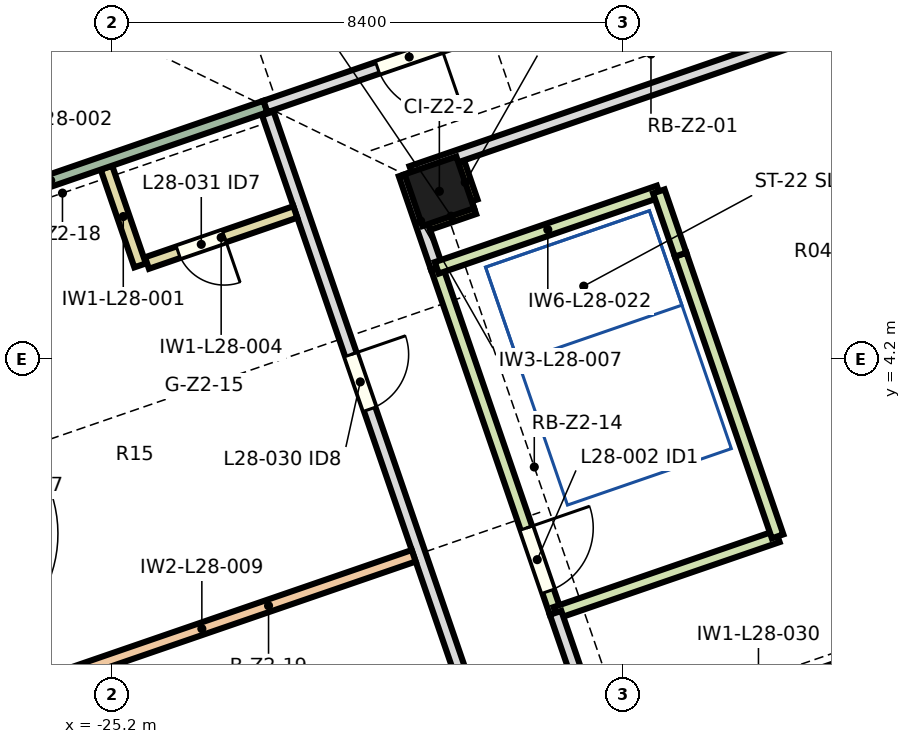
"""IFC4 building model, lengths in metres.
Left out: names, types, materials, properties, quantities, classifications, styles, units other than length and angle.
Written with IfcOpenShell. Run it as: python <this file> out.ifc"""

import sys

from ifc_helpers import new_model, si_unit, direction, frame, frame_2d, origin, origin_2d, place, context, subcontext, project, spatial, rectangle, extrude, element, fill, save


model = new_model("IFC4")
c1 = context("Model", 3, precision=1e-05, world=origin(), true_north=direction((0.0, 1.0)))
c2 = subcontext(c1, "Body", "Model", "MODEL_VIEW")
j1 = project(units=[si_unit("LENGTHUNIT", "METRE"), si_unit("PLANEANGLEUNIT", "RADIAN")], contexts=[c1])
p1 = place(None, origin())
s1 = spatial("IfcSite", under=j1, at=p1, CompositionType="ELEMENT")
p2 = place(p1, origin())
s2 = spatial("IfcBuilding", under=s1, at=p2, CompositionType="ELEMENT")
p3 = place(p2, frame((0.0, 0.0, 134.5)))
s3 = spatial("IfcBuildingStorey", under=s2, at=p3, CompositionType="ELEMENT", Elevation=134.5)
p4 = place(p3, frame((-19.802, 6.983, 0.0), z_axis=(0.0, 0.0, 1.0), x_axis=(0.945518575599, 0.325568154457, 0.0)))
e1 = element("IfcColumn", 1, at=p4, inside=s3, PredefinedType="COLUMN", context=c2, shape_type="SweptSolid", body=[
    extrude(rectangle(XDim=0.9, YDim=0.9, at=origin_2d()), origin(), (0.0, 0.0, 1.0), 3.55),
])
p5 = place(p3, frame((-28.282, 1.663, 0.0), z_axis=(0.0, 0.0, 1.0), x_axis=(0.325580990241, -0.945514155787, 0.0)))
e2 = element("IfcWall", 2, at=p5, inside=s3, PredefinedType="SOLIDWALL", context=c2, shape_type="SweptSolid", body=[
    extrude(rectangle(XDim=6.52, YDim=0.3, at=frame_2d((3.26, 0.0))), origin(), (0.0, 0.0, 1.0), 3.09),
])
p6 = place(p5, frame((0.33, 0.0, 0.0)))
e3 = element("IfcOpeningElement", 3, at=p6, cuts=e2, PredefinedType="OPENING", context=c2, shape_type="SweptSolid", body=[
    extrude(rectangle(XDim=2.1, YDim=2.4, at=frame_2d((1.05, 1.2))), frame((0.0, 0.16, 0.0), z_axis=(0.0, -1.0, 0.0), x_axis=(1.0, 0.0, 0.0)), (0.0, 0.0, 1.0), 0.32),
])
p7 = place(p5, frame((4.24, 0.0, 0.9)))
e4 = element("IfcOpeningElement", 4, at=p7, cuts=e2, PredefinedType="OPENING", context=c2, shape_type="SweptSolid", body=[
    extrude(rectangle(XDim=1.8, YDim=1.5, at=frame_2d((0.9, 0.75))), frame((0.0, 0.16, 0.0), z_axis=(0.0, -1.0, 0.0), x_axis=(1.0, 0.0, 0.0)), (0.0, 0.0, 1.0), 0.32),
])
p8 = place(p3, frame((-24.724, 5.765, 0.0), z_axis=(0.0, 0.0, 1.0), x_axis=(-0.325561349174, 0.945520918819, 0.0)))
e5 = element("IfcWall", 5, at=p8, inside=s3, PredefinedType="PARTITIONING", context=c2, shape_type="SweptSolid", body=[
    extrude(rectangle(XDim=1.7, YDim=0.2, at=frame_2d((0.85, 0.0))), origin(), (0.0, 0.0, 1.0), 3.55),
])
p9 = place(p3, frame((-22.662, 8.378, 0.0), z_axis=(0.0, 0.0, 1.0), x_axis=(-0.945512517373, -0.325585748291, 0.0)))
e6 = element("IfcWall", 6, at=p9, inside=s3, PredefinedType="PARTITIONING", context=c2, shape_type="SweptSolid", body=[
    extrude(rectangle(XDim=7.47, YDim=0.2, at=frame_2d((3.735, 0.0))), origin(), (0.0, 0.0, 1.0), 3.55),
])
p10 = place(p3, frame((-22.623, 8.265, 0.0), z_axis=(0.0, 0.0, 1.0), x_axis=(0.325567058058, -0.945518953119, 0.0)))
e7 = element("IfcWall", 7, at=p10, inside=s3, PredefinedType="PARTITIONING", context=c2, shape_type="SweptSolid", body=[
    extrude(rectangle(XDim=30.48, YDim=0.2, at=frame_2d((15.24, 0.0))), origin(), (0.0, 0.0, 1.0), 3.55),
])
p11 = place(p10, frame((4.195, 0.0, 0.0)))
e8 = element("IfcOpeningElement", 8, at=p11, cuts=e7, PredefinedType="OPENING", context=c2, shape_type="SweptSolid", body=[
    extrude(rectangle(XDim=0.95, YDim=2.1, at=frame_2d((0.475, 1.05))), frame((0.0, 0.11, 0.0), z_axis=(0.0, -1.0, 0.0), x_axis=(1.0, 0.0, 0.0)), (0.0, 0.0, 1.0), 0.22),
])
p12 = place(p10, frame((10.045, 0.0, 0.0)))
e9 = element("IfcOpeningElement", 9, at=p12, cuts=e7, PredefinedType="OPENING", context=c2, shape_type="SweptSolid", body=[
    extrude(rectangle(XDim=0.95, YDim=2.1, at=frame_2d((0.475, 1.05))), frame((0.0, 0.11, 0.0), z_axis=(0.0, -1.0, 0.0), x_axis=(1.0, 0.0, 0.0)), (0.0, 0.0, 1.0), 0.22),
])
p13 = place(p10, frame((21.42, 0.0, 0.0)))
e10 = element("IfcOpeningElement", 10, at=p13, cuts=e7, PredefinedType="OPENING", context=c2, shape_type="SweptSolid", body=[
    extrude(rectangle(XDim=1.0, YDim=2.1, at=frame_2d((0.5, 1.05))), frame((0.0, 0.11, 0.0), z_axis=(0.0, -1.0, 0.0), x_axis=(1.0, 0.0, 0.0)), (0.0, 0.0, 1.0), 0.22),
])
p14 = place(p10, frame((27.095, 0.0, 0.0)))
e11 = element("IfcOpeningElement", 11, at=p14, cuts=e7, PredefinedType="OPENING", context=c2, shape_type="SweptSolid", body=[
    extrude(rectangle(XDim=0.95, YDim=2.1, at=frame_2d((0.475, 1.05))), frame((0.0, 0.11, 0.0), z_axis=(0.0, -1.0, 0.0), x_axis=(1.0, 0.0, 0.0)), (0.0, 0.0, 1.0), 0.22),
])
p15 = place(p3, frame((-22.171, 6.644, 0.0), z_axis=(0.0, 0.0, 1.0), x_axis=(-0.945533766078, -0.325524034759, 0.0)))
e12 = element("IfcWall", 12, at=p15, inside=s3, PredefinedType="PARTITIONING", context=c2, shape_type="SweptSolid", body=[
    extrude(rectangle(XDim=2.58, YDim=0.2, at=frame_2d((1.29, 0.0))), origin(), (0.0, 0.0, 1.0), 3.55),
])
p16 = place(p15, frame((1.236, 0.0, 0.0)))
e13 = element("IfcOpeningElement", 13, at=p16, cuts=e12, PredefinedType="OPENING", context=c2, shape_type="SweptSolid", body=[
    extrude(rectangle(XDim=0.8, YDim=2.1, at=frame_2d((0.4, 1.05))), frame((0.0, 0.11, 0.0), z_axis=(0.0, -1.0, 0.0), x_axis=(1.0, 0.0, 0.0)), (0.0, 0.0, 1.0), 0.22),
])
p17 = place(p3, frame((-20.375, 7.262, 0.0), z_axis=(0.0, 0.0, 1.0), x_axis=(0.325532736599, -0.945530770204, 0.0)))
e14 = element("IfcWall", 14, at=p17, inside=s3, PredefinedType="PARTITIONING", context=c2, shape_type="SweptSolid", body=[
    extrude(rectangle(XDim=1.627, YDim=0.2, at=frame_2d((0.813, 0.0))), origin(), (0.0, 0.0, 1.0), 3.55),
])
p18 = place(p3, frame((-20.224, 0.99, 0.0), z_axis=(0.0, 0.0, 1.0), x_axis=(-0.945516523202, -0.32557411499, 0.0)))
e15 = element("IfcWall", 15, at=p18, inside=s3, PredefinedType="PARTITIONING", context=c2, shape_type="SweptSolid", body=[
    extrude(rectangle(XDim=7.37, YDim=0.2, at=frame_2d((3.685, 0.0))), origin(), (0.0, 0.0, 1.0), 3.05),
])
p19 = place(p3, frame((-19.987, 6.444, 0.0), z_axis=(0.0, 0.0, 1.0), x_axis=(0.945586856903, 0.325369783557, 0.0)))
e16 = element("IfcWall", 16, at=p19, inside=s3, PredefinedType="PARTITIONING", context=c2, shape_type="SweptSolid", body=[
    extrude(rectangle(XDim=0.8, YDim=0.2, at=frame_2d((0.4, 0.0))), origin(), (0.0, 0.0, 1.0), 3.55),
])
p20 = place(p3, frame((-19.845, 5.724, 0.0), z_axis=(0.0, 0.0, 1.0), x_axis=(0.325563034341, -0.945520338581, 0.0)))
e17 = element("IfcWall", 17, at=p20, inside=s3, PredefinedType="SOLIDWALL", context=c2, shape_type="SweptSolid", body=[
    extrude(rectangle(XDim=6.0, YDim=0.2, at=frame_2d((3.0, 0.0))), origin(), (0.0, 0.0, 1.0), 3.55),
])
p21 = place(p20, frame((4.525, 0.0, 0.0)))
e18 = element("IfcOpeningElement", 18, at=p21, cuts=e17, PredefinedType="OPENING", context=c2, shape_type="SweptSolid", body=[
    extrude(rectangle(XDim=1.1, YDim=2.1, at=frame_2d((0.55, 1.05))), frame((0.0, 0.11, 0.0), z_axis=(0.0, -1.0, 0.0), x_axis=(1.0, 0.0, 0.0)), (0.0, 0.0, 1.0), 0.22),
])
p22 = place(p3, frame((-19.27, 6.818, 0.0), z_axis=(0.0, 0.0, 1.0), x_axis=(-0.32553462645, 0.945530119553, 0.0)))
e19 = element("IfcWall", 19, at=p22, inside=s3, PredefinedType="PARTITIONING", context=c2, shape_type="SweptSolid", body=[
    extrude(rectangle(XDim=0.66, YDim=0.2, at=frame_2d((0.33, 0.0))), origin(), (0.0, 0.0, 1.0), 3.55),
])
p23 = place(p3, frame((-17.892, 0.051, 0.0), z_axis=(0.0, 0.0, 1.0), x_axis=(0.945514621213, 0.325579638603, 0.0)))
e20 = element("IfcWall", 20, at=p23, inside=s3, PredefinedType="SOLIDWALL", context=c2, shape_type="SweptSolid", body=[
    extrude(rectangle(XDim=3.863, YDim=0.2, at=frame_2d((1.931, 0.0))), origin(), (0.0, 0.0, 1.0), 3.55),
])
p24 = place(p3, frame((-17.892, 0.051, 0.0), z_axis=(0.0, 0.0, 1.0), x_axis=(0.325580537834, -0.94551431157, 0.0)))
e21 = element("IfcWall", 21, at=p24, inside=s3, PredefinedType="PARTITIONING", context=c2, shape_type="SweptSolid", body=[
    extrude(rectangle(XDim=19.374, YDim=0.2, at=frame_2d((9.687, 0.0))), origin(), (0.0, 0.0, 1.0), 3.55),
])
p25 = place(p24, frame((9.786, 0.0, 0.0)))
e22 = element("IfcOpeningElement", 22, at=p25, cuts=e21, PredefinedType="OPENING", context=c2, shape_type="SweptSolid", body=[
    extrude(rectangle(XDim=0.9, YDim=2.1, at=frame_2d((0.45, 1.05))), frame((0.0, 0.11, 0.0), z_axis=(0.0, -1.0, 0.0), x_axis=(1.0, 0.0, 0.0)), (0.0, 0.0, 1.0), 0.22),
])
p26 = place(p3, frame((-16.193, 6.982, 0.0), z_axis=(0.0, 0.0, 1.0), x_axis=(-0.945507920529, -0.325599097382, 0.0)))
e23 = element("IfcWall", 23, at=p26, inside=s3, PredefinedType="SOLIDWALL", context=c2, shape_type="SweptSolid", body=[
    extrude(rectangle(XDim=3.862, YDim=0.2, at=frame_2d((1.931, 0.0))), origin(), (0.0, 0.0, 1.0), 3.55),
])
p27 = place(p3, frame((-14.24, 1.309, 0.0), z_axis=(0.0, 0.0, 1.0), x_axis=(-0.325599106316, 0.945507917453, 0.0)))
e24 = element("IfcWall", 24, at=p27, inside=s3, PredefinedType="SOLIDWALL", context=c2, shape_type="SweptSolid", body=[
    extrude(rectangle(XDim=4.9, YDim=0.2, at=frame_2d((2.45, 0.0))), origin(), (0.0, 0.0, 1.0), 3.55),
])
p28 = place(p3, frame((-12.104, -0.466, 0.0), z_axis=(0.0, 0.0, 1.0), x_axis=(-0.945514533015, -0.325579894737, 0.0)))
e25 = element("IfcWall", 25, at=p28, inside=s3, PredefinedType="PARTITIONING", context=c2, shape_type="SweptSolid", body=[
    extrude(rectangle(XDim=5.184, YDim=0.2, at=frame_2d((2.592, 0.0))), origin(), (0.0, 0.0, 1.0), 3.55),
])
p29 = place(p3, frame((4.599, 15.862, 0.0), z_axis=(0.0, 0.0, 1.0), x_axis=(-0.94551912499, -0.325566558907, 0.0)))
e26 = element("IfcWall", 26, at=p29, inside=s3, PredefinedType="PARTITIONING", context=c2, shape_type="SweptSolid", body=[
    extrude(rectangle(XDim=26.293, YDim=0.2, at=frame_2d((13.146, 0.0))), origin(), (0.0, 0.0, 1.0), 3.55),
])
p30 = place(p29, frame((10.81, 0.0, 0.0)))
e27 = element("IfcOpeningElement", 27, at=p30, cuts=e26, PredefinedType="OPENING", context=c2, shape_type="SweptSolid", body=[
    extrude(rectangle(XDim=0.9, YDim=2.1, at=frame_2d((0.45, 1.05))), frame((0.0, 0.11, 0.0), z_axis=(0.0, -1.0, 0.0), x_axis=(1.0, 0.0, 0.0)), (0.0, 0.0, 1.0), 0.22),
])
p31 = place(p29, frame((3.865, 0.0, 0.0)))
e28 = element("IfcOpeningElement", 28, at=p31, cuts=e26, PredefinedType="OPENING", context=c2, shape_type="SweptSolid", body=[
    extrude(rectangle(XDim=2.0, YDim=2.1, at=frame_2d((1.0, 1.05))), frame((0.0, 0.11, 0.0), z_axis=(0.0, -1.0, 0.0), x_axis=(1.0, 0.0, 0.0)), (0.0, 0.0, 1.0), 0.22),
])
p32 = place(p3, frame((-11.86, 12.098, 0.0), z_axis=(0.0, 0.0, 1.0), x_axis=(-0.945521627167, -0.325559291927, 0.0)))
e29 = element("IfcWall", 29, at=p32, inside=s3, PredefinedType="PARTITIONING", context=c2, shape_type="SweptSolid", body=[
    extrude(rectangle(XDim=11.425, YDim=0.2, at=frame_2d((5.712, 0.0))), origin(), (0.0, 0.0, 1.0), 3.55),
])
p33 = place(p32, frame((2.45, 0.0, 0.0)))
e30 = element("IfcOpeningElement", 30, at=p33, cuts=e29, PredefinedType="OPENING", context=c2, shape_type="SweptSolid", body=[
    extrude(rectangle(XDim=0.95, YDim=2.1, at=frame_2d((0.475, 1.05))), frame((0.0, 0.11, 0.0), z_axis=(0.0, -1.0, 0.0), x_axis=(1.0, 0.0, 0.0)), (0.0, 0.0, 1.0), 0.22),
])
p34 = place(p32, frame((8.375, 0.0, 0.0)))
e31 = element("IfcOpeningElement", 31, at=p34, cuts=e29, PredefinedType="OPENING", context=c2, shape_type="SweptSolid", body=[
    extrude(rectangle(XDim=1.1, YDim=2.1, at=frame_2d((0.55, 1.05))), frame((0.0, 0.11, 0.0), z_axis=(0.0, -1.0, 0.0), x_axis=(1.0, 0.0, 0.0)), (0.0, 0.0, 1.0), 0.22),
])
p35 = place(p3, frame((-15.835, 5.942, 0.0), z_axis=(0.0, 0.0, 1.0), x_axis=(-0.325600768791, 0.945507344955, 0.0)))
e32 = element("IfcWall", 32, at=p35, inside=s3, PredefinedType="SOLIDWALL", context=c2, shape_type="SweptSolid", body=[
    extrude(rectangle(XDim=1.1, YDim=0.2, at=frame_2d((0.55, 0.0))), origin(), (0.0, 0.0, 1.0), 3.55),
])
p36 = place(p21, origin())
e33 = element("IfcDoor", 33, at=p36, inside=s3, OperationType="NOTDEFINED", PredefinedType="DOOR", context=c2, shape_type="SweptSolid", body=[
    extrude(rectangle(XDim=1.1, YDim=2.1, at=frame_2d((0.55, 1.05))), frame((0.0, 0.025, 0.0), z_axis=(0.0, -1.0, 0.0), x_axis=(1.0, 0.0, 0.0)), (0.0, 0.0, 1.0), 0.05),
])
fill(e18, e33)
p37 = place(p34, origin())
e34 = element("IfcDoor", 34, at=p37, inside=s3, OperationType="NOTDEFINED", PredefinedType="DOOR", context=c2, shape_type="SweptSolid", body=[
    extrude(rectangle(XDim=1.1, YDim=2.1, at=frame_2d((0.55, 1.05))), frame((0.0, 0.025, 0.0), z_axis=(0.0, -1.0, 0.0), x_axis=(1.0, 0.0, 0.0)), (0.0, 0.0, 1.0), 0.05),
])
fill(e31, e34)
p38 = place(p11, origin())
e35 = element("IfcDoor", 35, at=p38, inside=s3, OperationType="NOTDEFINED", PredefinedType="DOOR", context=c2, shape_type="SweptSolid", body=[
    extrude(rectangle(XDim=0.95, YDim=2.1, at=frame_2d((0.475, 1.05))), frame((0.0, 0.025, 0.0), z_axis=(0.0, -1.0, 0.0), x_axis=(1.0, 0.0, 0.0)), (0.0, 0.0, 1.0), 0.05),
])
fill(e8, e35)
p39 = place(p16, origin())
e36 = element("IfcDoor", 36, at=p39, inside=s3, OperationType="NOTDEFINED", PredefinedType="DOOR", context=c2, shape_type="SweptSolid", body=[
    extrude(rectangle(XDim=0.8, YDim=2.1, at=frame_2d((0.4, 1.05))), frame((0.0, 0.025, 0.0), z_axis=(0.0, -1.0, 0.0), x_axis=(1.0, 0.0, 0.0)), (0.0, 0.0, 1.0), 0.05),
])
fill(e13, e36)
save(model, sys.argv[1])
